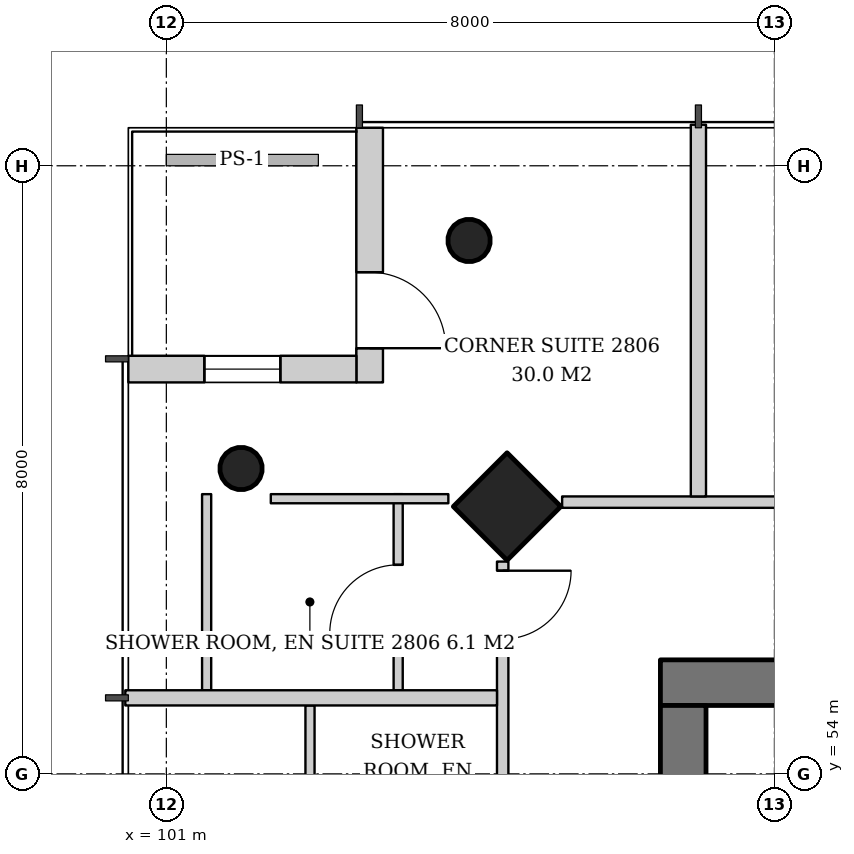
"""IFC4 building model, lengths in metres.
Left out: names, types, materials, properties, quantities, classifications, styles, units other than length and angle.
Written with IfcOpenShell. Run it as: python <this file> out.ifc"""

import sys

from ifc_helpers import new_model, si_unit, direction, frame, frame_2d, origin, origin_2d, place, context, subcontext, project, spatial, rectangle, hollow_circle, extrude, element, fill, save


model = new_model("IFC4")
c1 = context("Model", 3, precision=1e-05, world=origin(), true_north=direction((0.0, 1.0)))
c2 = subcontext(c1, "Body", "Model", "MODEL_VIEW")
j1 = project(units=[si_unit("LENGTHUNIT", "METRE"), si_unit("PLANEANGLEUNIT", "RADIAN")], contexts=[c1])
p1 = place(None, origin())
s1 = spatial("IfcSite", under=j1, at=p1, CompositionType="ELEMENT")
p2 = place(p1, origin())
s2 = spatial("IfcBuilding", under=s1, at=p2, CompositionType="ELEMENT")
p3 = place(p2, frame((0.0, 0.0, 112.2)))
s3 = spatial("IfcBuildingStorey", under=s2, at=p3, CompositionType="ELEMENT", Elevation=112.2)
p4 = place(p3, frame((105.431, 57.569, 0.0), z_axis=(0.042965756413, -0.042965756413, 0.998152236661), x_axis=(0.707106781187, 0.707106781187, 0.0)))
e1 = element("IfcColumn", 1, at=p4, inside=s3, PredefinedType="COLUMN", context=c2, shape_type="SweptSolid", body=[
    extrude(rectangle(XDim=1.0, YDim=1.0, at=origin_2d()), origin(), (0.0, 0.0, 1.0), 3.807),
])
for number, where, z_axis, x_axis in (
    (2, (104.931, 61.069, 0.0), (0.043, -0.043, 0.998), (0.707, 0.707, 0.0)),
    (3, (101.931, 58.069, 0.0), (0.043, -0.043, 0.998), (0.707, 0.707, 0.0)),
):
    element("IfcColumn", number, at=place(p3, frame(where, z_axis=z_axis, x_axis=x_axis)), inside=s3, PredefinedType="COLUMN", context=c2, shape_type="SweptSolid", body=[
        extrude(hollow_circle(Radius=0.28, WallThickness=0.02, at=origin_2d()), origin(), (0.0, 0.0, 1.0), 3.807),
    ])
p5 = place(p3, frame((107.5, 55.2, 0.0), z_axis=(0.0, 0.0, 1.0), x_axis=(1.0, 0.0, 0.0)))
e4 = element("IfcWall", 4, at=p5, inside=s3, PredefinedType="SHEAR", context=c2, shape_type="SweptSolid", body=[
    extrude(rectangle(XDim=19.0, YDim=0.6, at=frame_2d((9.5, 0.0))), origin(), (0.0, 0.0, 1.0), 3.8),
])
p6 = place(p5, frame((14.14, 0.0, 0.0)))
e5 = element("IfcOpeningElement", 5, at=p6, cuts=e4, PredefinedType="OPENING", context=c2, shape_type="SweptSolid", body=[
    extrude(rectangle(XDim=1.0, YDim=2.1, at=frame_2d((0.5, 1.05))), frame((0.0, 0.31, 0.0), z_axis=(0.0, -1.0, 0.0), x_axis=(1.0, 0.0, 0.0)), (0.0, 0.0, 1.0), 0.62),
])
p7 = place(p5, frame((2.425, 0.0, 0.0)))
e6 = element("IfcOpeningElement", 6, at=p7, cuts=e4, PredefinedType="OPENING", context=c2, shape_type="SweptSolid", body=[
    extrude(rectangle(XDim=1.0, YDim=2.1, at=frame_2d((0.5, 1.05))), frame((0.0, 0.31, 0.0), z_axis=(0.0, -1.0, 0.0), x_axis=(1.0, 0.0, 0.0)), (0.0, 0.0, 1.0), 0.62),
])
p8 = place(p3, frame((107.8, 37.1, 0.0), z_axis=(0.0, 0.0, 1.0), x_axis=(0.0, 1.0, 0.0)))
e7 = element("IfcWall", 7, at=p8, inside=s3, PredefinedType="SHEAR", context=c2, shape_type="SweptSolid", body=[
    extrude(rectangle(XDim=17.8, YDim=0.6, at=frame_2d((8.9, 0.0))), origin(), (0.0, 0.0, 1.0), 3.8),
])
p9 = place(p8, frame((8.0, 0.0, 0.0)))
e8 = element("IfcOpeningElement", 8, at=p9, cuts=e7, PredefinedType="OPENING", context=c2, shape_type="SweptSolid", body=[
    extrude(rectangle(XDim=1.8, YDim=2.4, at=frame_2d((0.9, 1.2))), frame((0.0, 0.31, 0.0), z_axis=(0.0, -1.0, 0.0), x_axis=(1.0, 0.0, 0.0)), (0.0, 0.0, 1.0), 0.62),
])
p10 = place(p3, frame((103.675, 62.5, 0.0), z_axis=(0.0, 0.0, 1.0), x_axis=(0.0, -1.0, 0.0)))
e9 = element("IfcWall", 9, at=p10, inside=s3, PredefinedType="SOLIDWALL", context=c2, shape_type="SweptSolid", body=[
    extrude(rectangle(XDim=3.35, YDim=0.35, at=frame_2d((1.675, 0.0))), origin(), (0.0, 0.0, 1.0), 3.6),
])
p11 = place(p10, frame((1.9, 0.0, 0.0)))
e10 = element("IfcOpeningElement", 10, at=p11, cuts=e9, PredefinedType="OPENING", context=c2, shape_type="SweptSolid", body=[
    extrude(rectangle(XDim=1.0, YDim=2.4, at=frame_2d((0.5, 1.2))), frame((0.0, 0.185, 0.0), z_axis=(0.0, -1.0, 0.0), x_axis=(1.0, 0.0, 0.0)), (0.0, 0.0, 1.0), 0.37),
])
p12 = place(p3, frame((103.5, 59.325, 0.0), z_axis=(0.0, 0.0, 1.0), x_axis=(-1.0, 0.0, 0.0)))
e11 = element("IfcWall", 11, at=p12, inside=s3, PredefinedType="SOLIDWALL", context=c2, shape_type="SweptSolid", body=[
    extrude(rectangle(XDim=3.0, YDim=0.35, at=frame_2d((1.5, 0.0))), origin(), (0.0, 0.0, 1.0), 3.6),
])
p13 = place(p12, frame((1.0, 0.0, 0.9)))
e12 = element("IfcOpeningElement", 12, at=p13, cuts=e11, PredefinedType="OPENING", context=c2, shape_type="SweptSolid", body=[
    extrude(rectangle(XDim=1.0, YDim=2.4, at=frame_2d((0.5, 1.2))), frame((0.0, 0.185, 0.0), z_axis=(0.0, -1.0, 0.0), x_axis=(1.0, 0.0, 0.0)), (0.0, 0.0, 1.0), 0.37),
])
p14 = place(p3, frame((127.793, 57.575, 0.0), z_axis=(0.0, 0.0, 1.0), x_axis=(-1.0, 0.0, 0.0)))
e13 = element("IfcWall", 13, at=p14, inside=s3, PredefinedType="PARTITIONING", context=c2, shape_type="SweptSolid", body=[
    extrude(rectangle(XDim=21.586, YDim=0.15, at=frame_2d((10.793, 0.0))), origin(), (0.0, 0.0, 1.0), 2.9),
])
p15 = place(p14, frame((0.12, 0.0, 0.0)))
e14 = element("IfcOpeningElement", 14, at=p15, cuts=e13, PredefinedType="OPENING", context=c2, shape_type="SweptSolid", body=[
    extrude(rectangle(XDim=0.9, YDim=2.1, at=frame_2d((0.45, 1.05))), frame((0.0, 0.085, 0.0), z_axis=(0.0, -1.0, 0.0), x_axis=(1.0, 0.0, 0.0)), (0.0, 0.0, 1.0), 0.17),
])
p16 = place(p14, frame((4.543, 0.0, 0.0)))
e15 = element("IfcOpeningElement", 15, at=p16, cuts=e13, PredefinedType="OPENING", context=c2, shape_type="SweptSolid", body=[
    extrude(rectangle(XDim=0.9, YDim=2.1, at=frame_2d((0.45, 1.05))), frame((0.0, 0.085, 0.0), z_axis=(0.0, -1.0, 0.0), x_axis=(1.0, 0.0, 0.0)), (0.0, 0.0, 1.0), 0.17),
])
p17 = place(p14, frame((13.493, 0.0, 0.0)))
e16 = element("IfcOpeningElement", 16, at=p17, cuts=e13, PredefinedType="OPENING", context=c2, shape_type="SweptSolid", body=[
    extrude(rectangle(XDim=1.0, YDim=2.1, at=frame_2d((0.5, 1.05))), frame((0.0, 0.085, 0.0), z_axis=(0.0, -1.0, 0.0), x_axis=(1.0, 0.0, 0.0)), (0.0, 0.0, 1.0), 0.17),
])
p18 = place(p3, frame((108.0, 57.65, 0.0), z_axis=(0.0, 0.0, 1.0), x_axis=(0.0, 1.0, 0.0)))
e17 = element("IfcWall", 17, at=p18, inside=s3, PredefinedType="PARTITIONING", context=c2, shape_type="SweptSolid", body=[
    extrude(rectangle(XDim=4.89, YDim=0.2, at=frame_2d((2.445, 0.0))), origin(), (0.0, 0.0, 1.0), 3.2),
])
p19 = place(p3, frame((104.05, 55.1, 0.0), z_axis=(0.0, 0.0, 1.0), x_axis=(0.0, 1.0, 0.0)))
e18 = element("IfcWall", 18, at=p19, inside=s3, PredefinedType="PARTITIONING", context=c2, shape_type="SweptSolid", body=[
    extrude(rectangle(XDim=2.58, YDim=0.12, at=frame_2d((1.29, 0.0))), origin(), (0.0, 0.0, 1.0), 2.9),
])
p20 = place(p19, frame((0.75, 0.0, 0.0)))
e19 = element("IfcOpeningElement", 19, at=p20, cuts=e18, PredefinedType="OPENING", context=c2, shape_type="SweptSolid", body=[
    extrude(rectangle(XDim=0.9, YDim=2.1, at=frame_2d((0.45, 1.05))), frame((0.0, 0.07, 0.0), z_axis=(0.0, -1.0, 0.0), x_axis=(1.0, 0.0, 0.0)), (0.0, 0.0, 1.0), 0.14),
])
p21 = place(p3, frame((101.53, 55.1, 0.0), z_axis=(0.0, 0.0, 1.0), x_axis=(0.0, 1.0, 0.0)))
e20 = element("IfcWall", 20, at=p21, inside=s3, PredefinedType="PARTITIONING", context=c2, shape_type="SweptSolid", body=[
    extrude(rectangle(XDim=2.58, YDim=0.12, at=frame_2d((1.29, 0.0))), origin(), (0.0, 0.0, 1.0), 3.6),
])
p22 = place(p3, frame((104.71, 57.62, 0.0), z_axis=(0.0, 0.0, 1.0), x_axis=(-1.0, 0.0, 0.0)))
e21 = element("IfcWall", 21, at=p22, inside=s3, PredefinedType="PARTITIONING", context=c2, shape_type="SweptSolid", body=[
    extrude(rectangle(XDim=2.336, YDim=0.12, at=frame_2d((1.168, 0.0))), origin(), (0.0, 0.0, 1.0), 3.2),
])
p23 = place(p3, frame((102.89, 54.9, 0.0), z_axis=(0.0, 0.0, 1.0), x_axis=(0.0, -1.0, 0.0)))
e22 = element("IfcWall", 22, at=p23, inside=s3, PredefinedType="PARTITIONING", context=c2, shape_type="SweptSolid", body=[
    extrude(rectangle(XDim=2.42, YDim=0.12, at=frame_2d((1.21, 0.0))), origin(), (0.0, 0.0, 1.0), 3.6),
])
p24 = place(p3, frame((105.425, 56.793, 0.0), z_axis=(0.0, 0.0, 1.0), x_axis=(0.0, -1.0, 0.0)))
e23 = element("IfcWall", 23, at=p24, inside=s3, PredefinedType="PARTITIONING", context=c2, shape_type="SweptSolid", body=[
    extrude(rectangle(XDim=21.586, YDim=0.15, at=frame_2d((10.793, 0.0))), origin(), (0.0, 0.0, 1.0), 2.9),
])
p25 = place(p24, frame((0.12, 0.0, 0.0)))
e24 = element("IfcOpeningElement", 24, at=p25, cuts=e23, PredefinedType="OPENING", context=c2, shape_type="SweptSolid", body=[
    extrude(rectangle(XDim=0.9, YDim=2.1, at=frame_2d((0.45, 1.05))), frame((0.0, 0.085, 0.0), z_axis=(0.0, -1.0, 0.0), x_axis=(1.0, 0.0, 0.0)), (0.0, 0.0, 1.0), 0.17),
])
p26 = place(p24, frame((4.543, 0.0, 0.0)))
e25 = element("IfcOpeningElement", 25, at=p26, cuts=e23, PredefinedType="OPENING", context=c2, shape_type="SweptSolid", body=[
    extrude(rectangle(XDim=0.9, YDim=2.1, at=frame_2d((0.45, 1.05))), frame((0.0, 0.085, 0.0), z_axis=(0.0, -1.0, 0.0), x_axis=(1.0, 0.0, 0.0)), (0.0, 0.0, 1.0), 0.17),
])
p27 = place(p24, frame((12.543, 0.0, 0.0)))
e26 = element("IfcOpeningElement", 26, at=p27, cuts=e23, PredefinedType="OPENING", context=c2, shape_type="SweptSolid", body=[
    extrude(rectangle(XDim=1.0, YDim=2.1, at=frame_2d((0.5, 1.05))), frame((0.0, 0.085, 0.0), z_axis=(0.0, -1.0, 0.0), x_axis=(1.0, 0.0, 0.0)), (0.0, 0.0, 1.0), 0.17),
])
p28 = place(p24, frame((17.993, 0.0, 0.0)))
e27 = element("IfcOpeningElement", 27, at=p28, cuts=e23, PredefinedType="OPENING", context=c2, shape_type="SweptSolid", body=[
    extrude(rectangle(XDim=1.0, YDim=2.1, at=frame_2d((0.5, 1.05))), frame((0.0, 0.085, 0.0), z_axis=(0.0, -1.0, 0.0), x_axis=(1.0, 0.0, 0.0)), (0.0, 0.0, 1.0), 0.17),
])
p29 = place(p3, frame((105.35, 55.0, 0.0), z_axis=(0.0, 0.0, 1.0), x_axis=(-1.0, 0.0, 0.0)))
e28 = element("IfcWall", 28, at=p29, inside=s3, PredefinedType="PARTITIONING", context=c2, shape_type="SweptSolid", body=[
    extrude(rectangle(XDim=4.89, YDim=0.2, at=frame_2d((2.445, 0.0))), origin(), (0.0, 0.0, 1.0), 2.9),
])
p30 = place(p11, origin())
e29 = element("IfcDoor", 29, at=p30, inside=s3, OperationType="SINGLE_SWING_RIGHT", PredefinedType="DOOR", context=c2, shape_type="SweptSolid", body=[
    extrude(rectangle(XDim=1.0, YDim=2.4, at=frame_2d((0.5, 1.2))), frame((0.0, 0.025, 0.0), z_axis=(0.0, -1.0, 0.0), x_axis=(1.0, 0.0, 0.0)), (0.0, 0.0, 1.0), 0.05),
])
fill(e10, e29)
p31 = place(p13, origin())
e30 = element("IfcWindow", 30, at=p31, inside=s3, PartitioningType="SINGLE_PANEL", PredefinedType="WINDOW", context=c2, shape_type="SweptSolid", body=[
    extrude(rectangle(XDim=1.0, YDim=2.4, at=frame_2d((0.5, 1.2))), frame((0.0, 0.03, 0.0), z_axis=(0.0, -1.0, 0.0), x_axis=(1.0, 0.0, 0.0)), (0.0, 0.0, 1.0), 0.06),
])
fill(e12, e30)
p32 = place(p20, origin())
e31 = element("IfcDoor", 31, at=p32, inside=s3, OperationType="SINGLE_SWING_LEFT", PredefinedType="DOOR", context=c2, shape_type="SweptSolid", body=[
    extrude(rectangle(XDim=0.9, YDim=2.1, at=frame_2d((0.45, 1.05))), frame((0.0, 0.025, 0.0), z_axis=(0.0, -1.0, 0.0), x_axis=(1.0, 0.0, 0.0)), (0.0, 0.0, 1.0), 0.05),
])
fill(e19, e31)
p33 = place(p25, origin())
e32 = element("IfcDoor", 32, at=p33, inside=s3, OperationType="SINGLE_SWING_LEFT", PredefinedType="DOOR", context=c2, shape_type="SweptSolid", body=[
    extrude(rectangle(XDim=0.9, YDim=2.1, at=frame_2d((0.45, 1.05))), frame((0.0, 0.025, 0.0), z_axis=(0.0, -1.0, 0.0), x_axis=(1.0, 0.0, 0.0)), (0.0, 0.0, 1.0), 0.05),
])
fill(e24, e32)
save(model, sys.argv[1])
